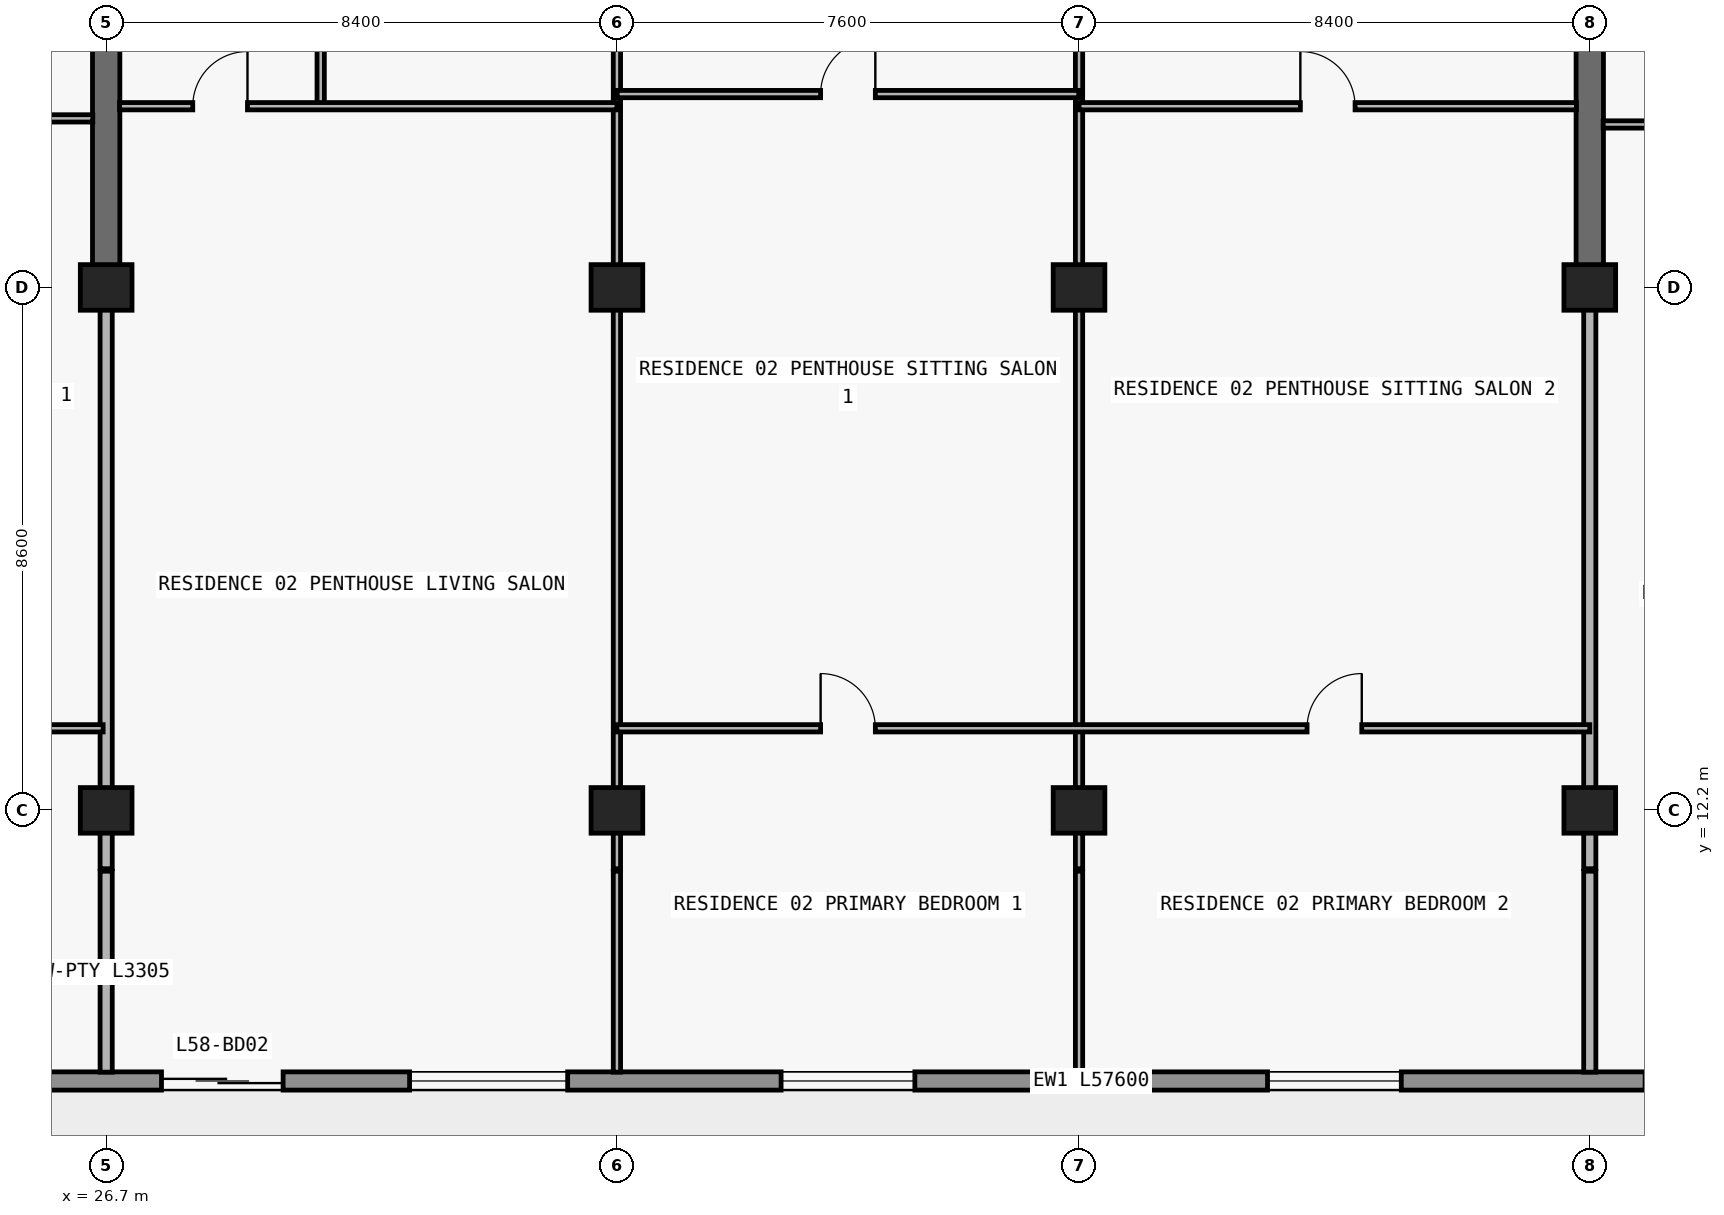
"""IFC4 building model, lengths in metres.
Left out: names, types, materials, properties, quantities, classifications, styles, units other than length and angle.
Written with IfcOpenShell. Run it as: python <this file> out.ifc"""

import sys

from ifc_helpers import new_model, si_unit, direction, frame, frame_2d, origin, origin_2d, place, context, subcontext, project, spatial, rectangle, extrude, element, fill, save


model = new_model("IFC4")
c1 = context("Model", 3, precision=1e-05, world=origin(), true_north=direction((0.0, 1.0)))
c2 = subcontext(c1, "Body", "Model", "MODEL_VIEW")
j1 = project(units=[si_unit("LENGTHUNIT", "METRE"), si_unit("PLANEANGLEUNIT", "RADIAN")], contexts=[c1])
p1 = place(None, origin())
s1 = spatial("IfcSite", under=j1, at=p1, CompositionType="ELEMENT")
p2 = place(p1, origin())
s2 = spatial("IfcBuilding", under=s1, at=p2, CompositionType="ELEMENT")
p3 = place(p2, frame((0.0, 0.0, 208.2)))
s3 = spatial("IfcBuildingStorey", under=s2, at=p3, CompositionType="ELEMENT", Elevation=208.2)
for number, where, z_axis, x_axis in (
    (1, (26.7, 12.2, 0.0), (0.0, 0.0, 1.0), (1.0, 0.0, 0.0)),
    (2, (35.1, 12.2, 0.0), (0.0, 0.0, 1.0), (1.0, 0.0, 0.0)),
    (3, (42.7, 12.2, 0.0), (0.0, 0.0, 1.0), (1.0, 0.0, 0.0)),
    (4, (51.1, 12.2, 0.0), (0.0, 0.0, 1.0), (1.0, 0.0, 0.0)),
    (5, (26.7, 20.8, 0.0), (0.0, 0.0, 1.0), (1.0, 0.0, 0.0)),
    (6, (35.1, 20.8, 0.0), (0.0, 0.0, 1.0), (1.0, 0.0, 0.0)),
    (7, (42.7, 20.8, 0.0), (0.0, 0.0, 1.0), (1.0, 0.0, 0.0)),
    (8, (51.1, 20.8, 0.0), (0.0, 0.0, 1.0), (1.0, 0.0, 0.0)),
):
    element("IfcColumn", number, at=place(p3, frame(where, z_axis=z_axis, x_axis=x_axis)), inside=s3, PredefinedType="COLUMN", context=c2, shape_type="SweptSolid", body=[
        extrude(rectangle(XDim=0.85, YDim=0.75, at=origin_2d()), origin(), (0.0, 0.0, 1.0), 3.05),
    ])
for number, where, z_axis, x_axis in (
    (9, (26.7, 20.8, 0.0), (0.0, 0.0, 1.0), (0.0, 1.0, 0.0)),
    (10, (51.1, 20.8, 0.0), (0.0, 0.0, 1.0), (0.0, 1.0, 0.0)),
):
    element("IfcWall", number, at=place(p3, frame(where, z_axis=z_axis, x_axis=x_axis)), inside=s3, PredefinedType="SHEAR", context=c2, shape_type="SweptSolid", body=[
        extrude(rectangle(XDim=8.6, YDim=0.45, at=frame_2d((4.3, 0.0))), origin(), (0.0, 0.0, 1.0), 3.05),
    ])
p4 = place(p3, frame((67.7, 7.75, 0.0), z_axis=(0.0, 0.0, 1.0), x_axis=(-1.0, 0.0, 0.0)))
e11 = element("IfcWall", 11, at=p4, inside=s3, PredefinedType="STANDARD", context=c2, shape_type="SweptSolid", body=[
    extrude(rectangle(XDim=57.6, YDim=0.3, at=frame_2d((28.8, 0.0))), origin(), (0.0, 0.0, 1.0), 3.05),
])
p5 = place(p4, frame((54.69, 0.0, 0.0)))
e12 = element("IfcOpeningElement", 12, at=p5, cuts=e11, PredefinedType="OPENING", context=c2, shape_type="SweptSolid", body=[
    extrude(rectangle(XDim=2.0, YDim=2.3, at=frame_2d((1.0, 1.15))), frame((0.0, 0.16, 0.0), z_axis=(0.0, -1.0, 0.0), x_axis=(1.0, 0.0, 0.0)), (0.0, 0.0, 1.0), 0.32),
])
p6 = place(p4, frame((50.21, 0.0, 0.65)))
e13 = element("IfcOpeningElement", 13, at=p6, cuts=e11, PredefinedType="OPENING", context=c2, shape_type="SweptSolid", body=[
    extrude(rectangle(XDim=2.6, YDim=1.85, at=frame_2d((1.3, 0.925))), frame((0.0, 0.16, 0.0), z_axis=(0.0, -1.0, 0.0), x_axis=(1.0, 0.0, 0.0)), (0.0, 0.0, 1.0), 0.32),
])
p7 = place(p4, frame((44.1, 0.0, 0.85)))
e14 = element("IfcOpeningElement", 14, at=p7, cuts=e11, PredefinedType="OPENING", context=c2, shape_type="SweptSolid", body=[
    extrude(rectangle(XDim=2.2, YDim=1.55, at=frame_2d((1.1, 0.775))), frame((0.0, 0.16, 0.0), z_axis=(0.0, -1.0, 0.0), x_axis=(1.0, 0.0, 0.0)), (0.0, 0.0, 1.0), 0.32),
])
p8 = place(p4, frame((38.09, 0.0, 0.0)))
e15 = element("IfcOpeningElement", 15, at=p8, cuts=e11, PredefinedType="OPENING", context=c2, shape_type="SweptSolid", body=[
    extrude(rectangle(XDim=2.0, YDim=2.3, at=frame_2d((1.0, 1.15))), frame((0.0, 0.16, 0.0), z_axis=(0.0, -1.0, 0.0), x_axis=(1.0, 0.0, 0.0)), (0.0, 0.0, 1.0), 0.32),
])
p9 = place(p4, frame((33.41, 0.0, 0.65)))
e16 = element("IfcOpeningElement", 16, at=p9, cuts=e11, PredefinedType="OPENING", context=c2, shape_type="SweptSolid", body=[
    extrude(rectangle(XDim=2.6, YDim=1.85, at=frame_2d((1.3, 0.925))), frame((0.0, 0.16, 0.0), z_axis=(0.0, -1.0, 0.0), x_axis=(1.0, 0.0, 0.0)), (0.0, 0.0, 1.0), 0.32),
])
p10 = place(p4, frame((27.7, 0.0, 0.85)))
e17 = element("IfcOpeningElement", 17, at=p10, cuts=e11, PredefinedType="OPENING", context=c2, shape_type="SweptSolid", body=[
    extrude(rectangle(XDim=2.2, YDim=1.55, at=frame_2d((1.1, 0.775))), frame((0.0, 0.16, 0.0), z_axis=(0.0, -1.0, 0.0), x_axis=(1.0, 0.0, 0.0)), (0.0, 0.0, 1.0), 0.32),
])
p11 = place(p4, frame((19.7, 0.0, 0.85)))
e18 = element("IfcOpeningElement", 18, at=p11, cuts=e11, PredefinedType="OPENING", context=c2, shape_type="SweptSolid", body=[
    extrude(rectangle(XDim=2.2, YDim=1.55, at=frame_2d((1.1, 0.775))), frame((0.0, 0.16, 0.0), z_axis=(0.0, -1.0, 0.0), x_axis=(1.0, 0.0, 0.0)), (0.0, 0.0, 1.0), 0.32),
])
p12 = place(p4, frame((13.69, 0.0, 0.0)))
e19 = element("IfcOpeningElement", 19, at=p12, cuts=e11, PredefinedType="OPENING", context=c2, shape_type="SweptSolid", body=[
    extrude(rectangle(XDim=2.0, YDim=2.3, at=frame_2d((1.0, 1.15))), frame((0.0, 0.16, 0.0), z_axis=(0.0, -1.0, 0.0), x_axis=(1.0, 0.0, 0.0)), (0.0, 0.0, 1.0), 0.32),
])
p13 = place(p4, frame((9.01, 0.0, 0.65)))
e20 = element("IfcOpeningElement", 20, at=p13, cuts=e11, PredefinedType="OPENING", context=c2, shape_type="SweptSolid", body=[
    extrude(rectangle(XDim=2.6, YDim=1.85, at=frame_2d((1.3, 0.925))), frame((0.0, 0.16, 0.0), z_axis=(0.0, -1.0, 0.0), x_axis=(1.0, 0.0, 0.0)), (0.0, 0.0, 1.0), 0.32),
])
p14 = place(p4, frame((3.0, 0.0, 0.85)))
e21 = element("IfcOpeningElement", 21, at=p14, cuts=e11, PredefinedType="OPENING", context=c2, shape_type="SweptSolid", body=[
    extrude(rectangle(XDim=2.2, YDim=1.55, at=frame_2d((1.1, 0.775))), frame((0.0, 0.16, 0.0), z_axis=(0.0, -1.0, 0.0), x_axis=(1.0, 0.0, 0.0)), (0.0, 0.0, 1.0), 0.32),
])
p15 = place(p3, frame((26.7, 7.895, 0.0), z_axis=(0.0, 0.0, 1.0), x_axis=(0.0, 1.0, 0.0)))
e22 = element("IfcWall", 22, at=p15, inside=s3, PredefinedType="PARTITIONING", context=c2, shape_type="SweptSolid", body=[
    extrude(rectangle(XDim=3.305, YDim=0.2, at=frame_2d((1.652, 0.0))), origin(), (0.0, 0.0, 1.0), 3.05),
])
p16 = place(p3, frame((26.7, 11.24, 0.0), z_axis=(0.0, 0.0, 1.0), x_axis=(0.0, 1.0, 0.0)))
e23 = element("IfcWall", 23, at=p16, inside=s3, PredefinedType="PARTITIONING", context=c2, shape_type="SweptSolid", body=[
    extrude(rectangle(XDim=9.555, YDim=0.2, at=frame_2d((4.777, 0.0))), origin(), (0.0, 0.0, 1.0), 2.263),
])
p17 = place(p3, frame((30.228, 23.78, 0.0), z_axis=(0.0, 0.0, 1.0), x_axis=(0.0, 1.0, 0.0)))
e24 = element("IfcWall", 24, at=p17, inside=s3, PredefinedType="PARTITIONING", context=c2, shape_type="SweptSolid", body=[
    extrude(rectangle(XDim=4.8, YDim=0.12, at=frame_2d((2.4, 0.0))), origin(), (0.0, 0.0, 1.0), 3.05),
])
p18 = place(p17, frame((1.95, 0.0, 0.0)))
e25 = element("IfcOpeningElement", 25, at=p18, cuts=e24, PredefinedType="OPENING", context=c2, shape_type="SweptSolid", body=[
    extrude(rectangle(XDim=0.9, YDim=2.15, at=frame_2d((0.45, 1.075))), frame((0.0, 0.07, 0.0), z_axis=(0.0, -1.0, 0.0), x_axis=(1.0, 0.0, 0.0)), (0.0, 0.0, 1.0), 0.14),
])
p19 = place(p3, frame((35.1, 7.895, 0.0), z_axis=(0.0, 0.0, 1.0), x_axis=(0.0, 1.0, 0.0)))
e26 = element("IfcWall", 26, at=p19, inside=s3, PredefinedType="PARTITIONING", context=c2, shape_type="SweptSolid", body=[
    extrude(rectangle(XDim=3.305, YDim=0.12, at=frame_2d((1.652, 0.0))), origin(), (0.0, 0.0, 1.0), 3.05),
])
p20 = place(p3, frame((35.1, 11.24, 0.0), z_axis=(0.0, 0.0, 1.0), x_axis=(0.0, 1.0, 0.0)))
e27 = element("IfcWall", 27, at=p20, inside=s3, PredefinedType="PARTITIONING", context=c2, shape_type="SweptSolid", body=[
    extrude(rectangle(XDim=22.76, YDim=0.12, at=frame_2d((11.38, 0.0))), origin(), (0.0, 0.0, 1.0), 2.263),
])
p21 = place(p20, frame((14.49, 0.0, 0.0)))
e28 = element("IfcOpeningElement", 28, at=p21, cuts=e27, PredefinedType="OPENING", context=c2, shape_type="SweptSolid", body=[
    extrude(rectangle(XDim=0.9, YDim=2.15, at=frame_2d((0.45, 1.075))), frame((0.0, 0.07, 0.0), z_axis=(0.0, -1.0, 0.0), x_axis=(1.0, 0.0, 0.0)), (0.0, 0.0, 1.0), 0.14),
])
p22 = place(p3, frame((42.7, 7.895, 0.0), z_axis=(0.0, 0.0, 1.0), x_axis=(0.0, 1.0, 0.0)))
e29 = element("IfcWall", 29, at=p22, inside=s3, PredefinedType="PARTITIONING", context=c2, shape_type="SweptSolid", body=[
    extrude(rectangle(XDim=3.305, YDim=0.12, at=frame_2d((1.652, 0.0))), origin(), (0.0, 0.0, 1.0), 3.05),
])
p23 = place(p3, frame((42.7, 11.24, 0.0), z_axis=(0.0, 0.0, 1.0), x_axis=(0.0, 1.0, 0.0)))
e30 = element("IfcWall", 30, at=p23, inside=s3, PredefinedType="PARTITIONING", context=c2, shape_type="SweptSolid", body=[
    extrude(rectangle(XDim=22.76, YDim=0.12, at=frame_2d((11.38, 0.0))), origin(), (0.0, 0.0, 1.0), 2.263),
])
p24 = place(p23, frame((14.49, 0.0, 0.0)))
e31 = element("IfcOpeningElement", 31, at=p24, cuts=e30, PredefinedType="OPENING", context=c2, shape_type="SweptSolid", body=[
    extrude(rectangle(XDim=0.9, YDim=2.15, at=frame_2d((0.45, 1.075))), frame((0.0, 0.07, 0.0), z_axis=(0.0, -1.0, 0.0), x_axis=(1.0, 0.0, 0.0)), (0.0, 0.0, 1.0), 0.14),
])
p25 = place(p3, frame((51.1, 7.895, 0.0), z_axis=(0.0, 0.0, 1.0), x_axis=(0.0, 1.0, 0.0)))
e32 = element("IfcWall", 32, at=p25, inside=s3, PredefinedType="PARTITIONING", context=c2, shape_type="SweptSolid", body=[
    extrude(rectangle(XDim=3.305, YDim=0.2, at=frame_2d((1.652, 0.0))), origin(), (0.0, 0.0, 1.0), 3.05),
])
p26 = place(p3, frame((51.1, 11.24, 0.0), z_axis=(0.0, 0.0, 1.0), x_axis=(0.0, 1.0, 0.0)))
e33 = element("IfcWall", 33, at=p26, inside=s3, PredefinedType="PARTITIONING", context=c2, shape_type="SweptSolid", body=[
    extrude(rectangle(XDim=9.555, YDim=0.2, at=frame_2d((4.777, 0.0))), origin(), (0.0, 0.0, 1.0), 2.263),
])
p27 = place(p3, frame((18.3, 13.55, 0.0), z_axis=(0.0, 0.0, 1.0), x_axis=(1.0, 0.0, 0.0)))
e34 = element("IfcWall", 34, at=p27, inside=s3, PredefinedType="PARTITIONING", context=c2, shape_type="SweptSolid", body=[
    extrude(rectangle(XDim=8.35, YDim=0.12, at=frame_2d((4.175, 0.0))), origin(), (0.0, 0.0, 1.0), 3.05),
])
p28 = place(p27, frame((3.725, 0.0, 0.0)))
e35 = element("IfcOpeningElement", 35, at=p28, cuts=e34, PredefinedType="OPENING", context=c2, shape_type="SweptSolid", body=[
    extrude(rectangle(XDim=0.9, YDim=2.15, at=frame_2d((0.45, 1.075))), frame((0.0, 0.07, 0.0), z_axis=(0.0, -1.0, 0.0), x_axis=(1.0, 0.0, 0.0)), (0.0, 0.0, 1.0), 0.14),
])
p29 = place(p3, frame((35.1, 13.55, 0.0), z_axis=(0.0, 0.0, 1.0), x_axis=(1.0, 0.0, 0.0)))
e36 = element("IfcWall", 36, at=p29, inside=s3, PredefinedType="PARTITIONING", context=c2, shape_type="SweptSolid", body=[
    extrude(rectangle(XDim=16.0, YDim=0.12, at=frame_2d((8.0, 0.0))), origin(), (0.0, 0.0, 1.0), 3.05),
])
p30 = place(p29, frame((3.35, 0.0, 0.0)))
e37 = element("IfcOpeningElement", 37, at=p30, cuts=e36, PredefinedType="OPENING", context=c2, shape_type="SweptSolid", body=[
    extrude(rectangle(XDim=0.9, YDim=2.15, at=frame_2d((0.45, 1.075))), frame((0.0, 0.07, 0.0), z_axis=(0.0, -1.0, 0.0), x_axis=(1.0, 0.0, 0.0)), (0.0, 0.0, 1.0), 0.14),
])
p31 = place(p29, frame((11.35, 0.0, 0.0)))
e38 = element("IfcOpeningElement", 38, at=p31, cuts=e36, PredefinedType="OPENING", context=c2, shape_type="SweptSolid", body=[
    extrude(rectangle(XDim=0.9, YDim=2.15, at=frame_2d((0.45, 1.075))), frame((0.0, 0.07, 0.0), z_axis=(0.0, -1.0, 0.0), x_axis=(1.0, 0.0, 0.0)), (0.0, 0.0, 1.0), 0.14),
])
p32 = place(p3, frame((51.32, 23.48, 0.0), z_axis=(0.0, 0.0, 1.0), x_axis=(1.0, 0.0, 0.0)))
e39 = element("IfcWall", 39, at=p32, inside=s3, PredefinedType="PARTITIONING", context=c2, shape_type="SweptSolid", body=[
    extrude(rectangle(XDim=8.18, YDim=0.12, at=frame_2d((4.09, 0.0))), origin(), (0.0, 0.0, 1.0), 3.05),
])
p33 = place(p32, frame((1.33, 0.0, 0.0)))
e40 = element("IfcOpeningElement", 40, at=p33, cuts=e39, PredefinedType="OPENING", context=c2, shape_type="SweptSolid", body=[
    extrude(rectangle(XDim=0.9, YDim=2.15, at=frame_2d((0.45, 1.075))), frame((0.0, 0.07, 0.0), z_axis=(0.0, -1.0, 0.0), x_axis=(1.0, 0.0, 0.0)), (0.0, 0.0, 1.0), 0.14),
])
p34 = place(p3, frame((18.305, 23.58, 0.0), z_axis=(0.0, 0.0, 1.0), x_axis=(1.0, 0.0, 0.0)))
e41 = element("IfcWall", 41, at=p34, inside=s3, PredefinedType="PARTITIONING", context=c2, shape_type="SweptSolid", body=[
    extrude(rectangle(XDim=8.175, YDim=0.12, at=frame_2d((4.087, 0.0))), origin(), (0.0, 0.0, 1.0), 3.05),
])
p35 = place(p34, frame((3.637, 0.0, 0.0)))
e42 = element("IfcOpeningElement", 42, at=p35, cuts=e41, PredefinedType="OPENING", context=c2, shape_type="SweptSolid", body=[
    extrude(rectangle(XDim=0.9, YDim=2.15, at=frame_2d((0.45, 1.075))), frame((0.0, 0.07, 0.0), z_axis=(0.0, -1.0, 0.0), x_axis=(1.0, 0.0, 0.0)), (0.0, 0.0, 1.0), 0.14),
])
p36 = place(p3, frame((26.92, 23.78, 0.0), z_axis=(0.0, 0.0, 1.0), x_axis=(1.0, 0.0, 0.0)))
e43 = element("IfcWall", 43, at=p36, inside=s3, PredefinedType="PARTITIONING", context=c2, shape_type="SweptSolid", body=[
    extrude(rectangle(XDim=8.18, YDim=0.12, at=frame_2d((4.09, 0.0))), origin(), (0.0, 0.0, 1.0), 3.05),
])
p37 = place(p36, frame((1.204, 0.0, 0.0)))
e44 = element("IfcOpeningElement", 44, at=p37, cuts=e43, PredefinedType="OPENING", context=c2, shape_type="SweptSolid", body=[
    extrude(rectangle(XDim=0.9, YDim=2.15, at=frame_2d((0.45, 1.075))), frame((0.0, 0.07, 0.0), z_axis=(0.0, -1.0, 0.0), x_axis=(1.0, 0.0, 0.0)), (0.0, 0.0, 1.0), 0.14),
])
p38 = place(p3, frame((42.7, 23.78, 0.0), z_axis=(0.0, 0.0, 1.0), x_axis=(1.0, 0.0, 0.0)))
e45 = element("IfcWall", 45, at=p38, inside=s3, PredefinedType="PARTITIONING", context=c2, shape_type="SweptSolid", body=[
    extrude(rectangle(XDim=8.18, YDim=0.12, at=frame_2d((4.09, 0.0))), origin(), (0.0, 0.0, 1.0), 3.05),
])
p39 = place(p38, frame((3.64, 0.0, 0.0)))
e46 = element("IfcOpeningElement", 46, at=p39, cuts=e45, PredefinedType="OPENING", context=c2, shape_type="SweptSolid", body=[
    extrude(rectangle(XDim=0.9, YDim=2.15, at=frame_2d((0.45, 1.075))), frame((0.0, 0.07, 0.0), z_axis=(0.0, -1.0, 0.0), x_axis=(1.0, 0.0, 0.0)), (0.0, 0.0, 1.0), 0.14),
])
p40 = place(p3, frame((35.105, 23.98, 0.0), z_axis=(0.0, 0.0, 1.0), x_axis=(1.0, 0.0, 0.0)))
e47 = element("IfcWall", 47, at=p40, inside=s3, PredefinedType="PARTITIONING", context=c2, shape_type="SweptSolid", body=[
    extrude(rectangle(XDim=7.59, YDim=0.12, at=frame_2d((3.795, 0.0))), origin(), (0.0, 0.0, 1.0), 3.05),
])
p41 = place(p40, frame((3.345, 0.0, 0.0)))
e48 = element("IfcOpeningElement", 48, at=p41, cuts=e47, PredefinedType="OPENING", context=c2, shape_type="SweptSolid", body=[
    extrude(rectangle(XDim=0.9, YDim=2.15, at=frame_2d((0.45, 1.075))), frame((0.0, 0.07, 0.0), z_axis=(0.0, -1.0, 0.0), x_axis=(1.0, 0.0, 0.0)), (0.0, 0.0, 1.0), 0.14),
])
p42 = place(p8, origin())
e49 = element("IfcDoor", 49, at=p42, inside=s3, OperationType="DOUBLE_DOOR_SLIDING", PredefinedType="DOOR", context=c2, shape_type="SweptSolid", body=[
    extrude(rectangle(XDim=2.0, YDim=2.3, at=frame_2d((1.0, 1.15))), frame((0.0, 0.025, 0.0), z_axis=(0.0, -1.0, 0.0), x_axis=(1.0, 0.0, 0.0)), (0.0, 0.0, 1.0), 0.05),
])
fill(e15, e49)
p43 = place(p9, origin())
e50 = element("IfcWindow", 50, at=p43, inside=s3, PartitioningType="SINGLE_PANEL", PredefinedType="WINDOW", context=c2, shape_type="SweptSolid", body=[
    extrude(rectangle(XDim=2.6, YDim=1.85, at=frame_2d((1.3, 0.925))), frame((0.0, 0.03, 0.0), z_axis=(0.0, -1.0, 0.0), x_axis=(1.0, 0.0, 0.0)), (0.0, 0.0, 1.0), 0.06),
])
fill(e16, e50)
p44 = place(p10, origin())
e51 = element("IfcWindow", 51, at=p44, inside=s3, PartitioningType="SINGLE_PANEL", PredefinedType="WINDOW", context=c2, shape_type="SweptSolid", body=[
    extrude(rectangle(XDim=2.2, YDim=1.55, at=frame_2d((1.1, 0.775))), frame((0.0, 0.03, 0.0), z_axis=(0.0, -1.0, 0.0), x_axis=(1.0, 0.0, 0.0)), (0.0, 0.0, 1.0), 0.06),
])
fill(e17, e51)
p45 = place(p11, origin())
e52 = element("IfcWindow", 52, at=p45, inside=s3, PartitioningType="SINGLE_PANEL", PredefinedType="WINDOW", context=c2, shape_type="SweptSolid", body=[
    extrude(rectangle(XDim=2.2, YDim=1.55, at=frame_2d((1.1, 0.775))), frame((0.0, 0.03, 0.0), z_axis=(0.0, -1.0, 0.0), x_axis=(1.0, 0.0, 0.0)), (0.0, 0.0, 1.0), 0.06),
])
fill(e18, e52)
p46 = place(p37, origin())
e53 = element("IfcDoor", 53, at=p46, inside=s3, OperationType="SINGLE_SWING_RIGHT", PredefinedType="DOOR", context=c2, shape_type="SweptSolid", body=[
    extrude(rectangle(XDim=0.9, YDim=2.15, at=frame_2d((0.45, 1.075))), frame((0.0, 0.025, 0.0), z_axis=(0.0, -1.0, 0.0), x_axis=(1.0, 0.0, 0.0)), (0.0, 0.0, 1.0), 0.05),
])
fill(e44, e53)
p47 = place(p41, origin())
e54 = element("IfcDoor", 54, at=p47, inside=s3, OperationType="SINGLE_SWING_RIGHT", PredefinedType="DOOR", context=c2, shape_type="SweptSolid", body=[
    extrude(rectangle(XDim=0.9, YDim=2.15, at=frame_2d((0.45, 1.075))), frame((0.0, 0.025, 0.0), z_axis=(0.0, -1.0, 0.0), x_axis=(1.0, 0.0, 0.0)), (0.0, 0.0, 1.0), 0.05),
])
fill(e48, e54)
p48 = place(p30, origin())
e55 = element("IfcDoor", 55, at=p48, inside=s3, OperationType="SINGLE_SWING_LEFT", PredefinedType="DOOR", context=c2, shape_type="SweptSolid", body=[
    extrude(rectangle(XDim=0.9, YDim=2.15, at=frame_2d((0.45, 1.075))), frame((0.0, 0.025, 0.0), z_axis=(0.0, -1.0, 0.0), x_axis=(1.0, 0.0, 0.0)), (0.0, 0.0, 1.0), 0.05),
])
fill(e37, e55)
p49 = place(p39, origin())
e56 = element("IfcDoor", 56, at=p49, inside=s3, OperationType="SINGLE_SWING_LEFT", PredefinedType="DOOR", context=c2, shape_type="SweptSolid", body=[
    extrude(rectangle(XDim=0.9, YDim=2.15, at=frame_2d((0.45, 1.075))), frame((0.0, 0.025, 0.0), z_axis=(0.0, -1.0, 0.0), x_axis=(1.0, 0.0, 0.0)), (0.0, 0.0, 1.0), 0.05),
])
fill(e46, e56)
p50 = place(p31, origin())
e57 = element("IfcDoor", 57, at=p50, inside=s3, OperationType="SINGLE_SWING_RIGHT", PredefinedType="DOOR", context=c2, shape_type="SweptSolid", body=[
    extrude(rectangle(XDim=0.9, YDim=2.15, at=frame_2d((0.45, 1.075))), frame((0.0, 0.025, 0.0), z_axis=(0.0, -1.0, 0.0), x_axis=(1.0, 0.0, 0.0)), (0.0, 0.0, 1.0), 0.05),
])
fill(e38, e57)
save(model, sys.argv[1])
